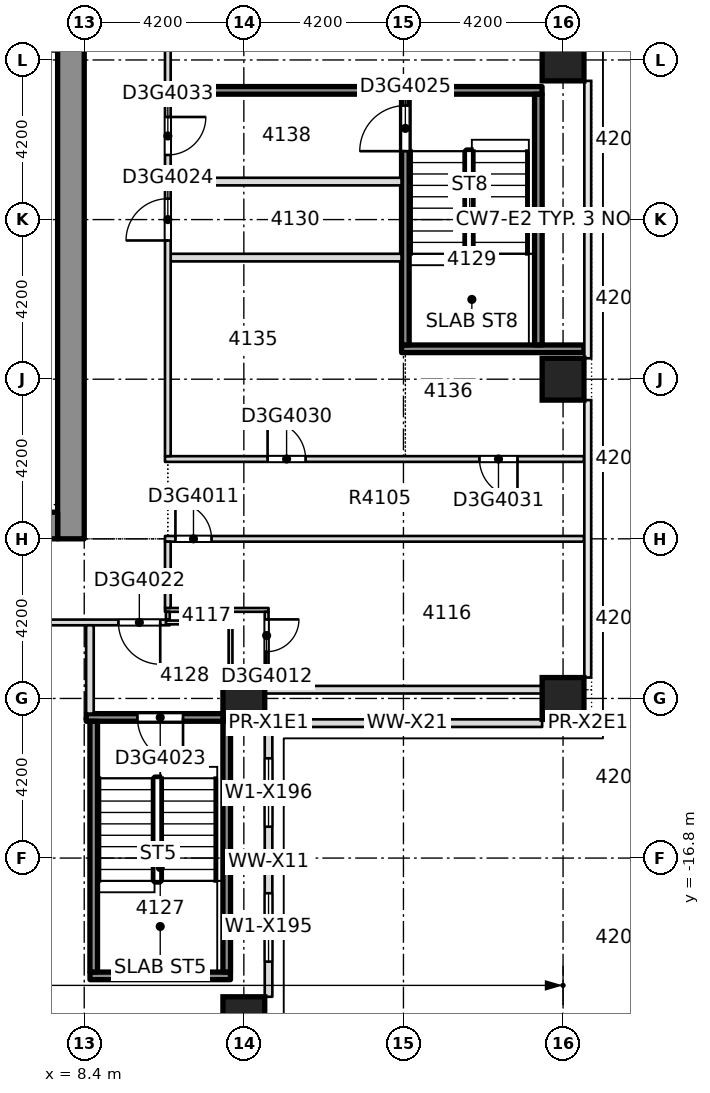
"""IFC4 building model, lengths in metres.
Left out: names, types, materials, properties, quantities, classifications, styles, units other than length and angle.
Written with IfcOpenShell. Run it as: python <this file> out.ifc"""

import sys

from ifc_helpers import new_model, si_unit, direction, frame, frame_2d, origin, origin_2d, place, context, subcontext, project, spatial, rectangle, extrude, element, fill, save


model = new_model("IFC4")
c1 = context("Model", 3, precision=1e-05, world=origin(), true_north=direction((0.0, 1.0)))
c2 = subcontext(c1, "Body", "Model", "MODEL_VIEW")
j1 = project(units=[si_unit("LENGTHUNIT", "METRE"), si_unit("PLANEANGLEUNIT", "RADIAN")], contexts=[c1])
p1 = place(None, origin())
s1 = spatial("IfcSite", under=j1, at=p1, CompositionType="ELEMENT")
p2 = place(p1, origin())
s2 = spatial("IfcBuilding", under=s1, at=p2, CompositionType="ELEMENT")
p3 = place(p2, frame((0.0, 0.0, 160.7)))
s3 = spatial("IfcBuildingStorey", under=s2, at=p3, CompositionType="ELEMENT", Elevation=160.7)
p4 = place(p3, frame((8.05, -8.4, -0.4), z_axis=(0.0, 0.0, 1.0), x_axis=(0.0, 1.0, 0.0)))
e1 = element("IfcWall", 1, at=p4, inside=s3, PredefinedType="SOLIDWALL", context=c2, shape_type="SweptSolid", body=[
    extrude(rectangle(XDim=30.15, YDim=0.7, at=frame_2d((15.075, 0.0))), origin(), (0.0, 0.0, 1.0), 3.45),
])
p5 = place(p4, frame((19.3, 0.0, 0.4)))
e2 = element("IfcOpeningElement", 2, at=p5, cuts=e1, PredefinedType="OPENING", context=c2, shape_type="SweptSolid", body=[
    extrude(rectangle(XDim=1.2, YDim=2.1, at=frame_2d((0.6, 1.05))), frame((0.0, 0.36, 0.0), z_axis=(0.0, -1.0, 0.0), x_axis=(1.0, 0.0, 0.0)), (0.0, 0.0, 1.0), 0.72),
])
p6 = place(p3, frame((-7.7, -8.05, -0.4), z_axis=(0.0, 0.0, 1.0), x_axis=(1.0, 0.0, 0.0)))
e3 = element("IfcWall", 3, at=p6, inside=s3, PredefinedType="SHEAR", context=c2, shape_type="SweptSolid", body=[
    extrude(rectangle(XDim=15.4, YDim=0.7, at=frame_2d((7.7, 0.0))), origin(), (0.0, 0.0, 1.0), 3.45),
])
p7 = place(p6, frame((2.95, 0.0, 0.4)))
e4 = element("IfcOpeningElement", 4, at=p7, cuts=e3, PredefinedType="OPENING", context=c2, shape_type="SweptSolid", body=[
    extrude(rectangle(XDim=1.8, YDim=2.1, at=frame_2d((0.9, 1.05))), frame((0.0, 0.36, 0.0), z_axis=(0.0, -1.0, 0.0), x_axis=(1.0, 0.0, 0.0)), (0.0, 0.0, 1.0), 0.72),
])
p8 = place(p6, frame((10.65, 0.0, 0.4)))
e5 = element("IfcOpeningElement", 5, at=p8, cuts=e3, PredefinedType="OPENING", context=c2, shape_type="SweptSolid", body=[
    extrude(rectangle(XDim=1.8, YDim=2.1, at=frame_2d((0.9, 1.05))), frame((0.0, 0.36, 0.0), z_axis=(0.0, -1.0, 0.0), x_axis=(1.0, 0.0, 0.0)), (0.0, 0.0, 1.0), 0.72),
])
for number, where, z_axis, x_axis in (
    (6, (12.6, -21.0, -0.4), (0.0, 0.0, 1.0), (1.0, 0.0, 0.0)),
    (7, (12.6, -12.6, -0.4), (0.0, 0.0, 1.0), (1.0, 0.0, 0.0)),
    (8, (21.0, -12.6, -0.4), (0.0, 0.0, 1.0), (1.0, 0.0, 0.0)),
    (9, (21.0, -4.2, -0.4), (0.0, 0.0, 1.0), (1.0, 0.0, 0.0)),
    (10, (21.0, 4.2, -0.4), (0.0, 0.0, 1.0), (1.0, 0.0, 0.0)),
):
    element("IfcColumn", number, at=place(p3, frame(where, z_axis=z_axis, x_axis=x_axis)), inside=s3, PredefinedType="COLUMN", context=c2, shape_type="SweptSolid", body=[
        extrude(rectangle(XDim=1.1, YDim=1.1, at=origin_2d()), origin(), (0.0, 0.0, 1.0), 3.45),
    ])
p9 = place(p3, frame((8.552, -19.9, 0.0), z_axis=(0.0, 0.0, 1.0), x_axis=(1.0, 0.0, 0.0)))
e11 = element("IfcWall", 11, at=p9, inside=s3, PredefinedType="SOLIDWALL", context=c2, shape_type="SweptSolid", body=[
    extrude(rectangle(XDim=3.696, YDim=0.2, at=frame_2d((1.848, 0.0))), origin(), (0.0, 0.0, 1.0), 3.05),
])
p10 = place(p3, frame((8.452, -13.1, 0.0), z_axis=(0.0, 0.0, 1.0), x_axis=(1.0, 0.0, 0.0)))
e12 = element("IfcWall", 12, at=p10, inside=s3, PredefinedType="SOLIDWALL", context=c2, shape_type="SweptSolid", body=[
    extrude(rectangle(XDim=3.896, YDim=0.2, at=frame_2d((1.948, 0.0))), origin(), (0.0, 0.0, 1.0), 3.05),
])
p11 = place(p10, frame((1.348, 0.0, 0.0)))
e13 = element("IfcOpeningElement", 13, at=p11, cuts=e12, PredefinedType="OPENING", context=c2, shape_type="SweptSolid", body=[
    extrude(rectangle(XDim=1.2, YDim=2.1, at=frame_2d((0.6, 1.05))), frame((0.0, 0.11, 0.0), z_axis=(0.0, -1.0, 0.0), x_axis=(1.0, 0.0, 0.0)), (0.0, 0.0, 1.0), 0.22),
])
p12 = place(p3, frame((12.152, -12.37, 0.0), z_axis=(0.0, 0.0, 1.0), x_axis=(1.0, 0.0, 0.0)))
e14 = element("IfcWall", 14, at=p12, inside=s3, PredefinedType="PARTITIONING", context=c2, shape_type="SweptSolid", body=[
    extrude(rectangle(XDim=1.098, YDim=0.1, at=frame_2d((0.549, 0.0))), origin(), (0.0, 0.0, 1.0), 3.05),
])
p13 = place(p3, frame((-10.6, -10.6, 0.0), z_axis=(0.0, 0.0, 1.0), x_axis=(1.0, 0.0, 0.0)))
e15 = element("IfcWall", 15, at=p13, inside=s3, PredefinedType="PARTITIONING", context=c2, shape_type="SweptSolid", body=[
    extrude(rectangle(XDim=21.25, YDim=0.15, at=frame_2d((10.625, 0.0))), origin(), (0.0, 0.0, 1.0), 3.05),
])
p14 = place(p13, frame((4.925, 0.0, 0.0)))
e16 = element("IfcOpeningElement", 16, at=p14, cuts=e15, PredefinedType="OPENING", context=c2, shape_type="SweptSolid", body=[
    extrude(rectangle(XDim=0.95, YDim=2.1, at=frame_2d((0.475, 1.05))), frame((0.0, 0.085, 0.0), z_axis=(0.0, -1.0, 0.0), x_axis=(1.0, 0.0, 0.0)), (0.0, 0.0, 1.0), 0.17),
])
p15 = place(p13, frame((15.325, 0.0, 0.0)))
e17 = element("IfcOpeningElement", 17, at=p15, cuts=e15, PredefinedType="OPENING", context=c2, shape_type="SweptSolid", body=[
    extrude(rectangle(XDim=0.95, YDim=2.1, at=frame_2d((0.475, 1.05))), frame((0.0, 0.085, 0.0), z_axis=(0.0, -1.0, 0.0), x_axis=(1.0, 0.0, 0.0)), (0.0, 0.0, 1.0), 0.17),
])
p16 = place(p13, frame((0.2, 0.0, 0.0)))
e18 = element("IfcOpeningElement", 18, at=p16, cuts=e15, PredefinedType="OPENING", context=c2, shape_type="SweptSolid", body=[
    extrude(rectangle(XDim=1.1, YDim=2.1, at=frame_2d((0.55, 1.05))), frame((0.0, 0.085, 0.0), z_axis=(0.0, -1.0, 0.0), x_axis=(1.0, 0.0, 0.0)), (0.0, 0.0, 1.0), 0.17),
])
p17 = place(p13, frame((10.05, 0.0, 0.0)))
e19 = element("IfcOpeningElement", 19, at=p17, cuts=e15, PredefinedType="OPENING", context=c2, shape_type="SweptSolid", body=[
    extrude(rectangle(XDim=1.1, YDim=2.1, at=frame_2d((0.55, 1.05))), frame((0.0, 0.085, 0.0), z_axis=(0.0, -1.0, 0.0), x_axis=(1.0, 0.0, 0.0)), (0.0, 0.0, 1.0), 0.17),
])
p18 = place(p13, frame((19.9, 0.0, 0.0)))
e20 = element("IfcOpeningElement", 20, at=p18, cuts=e15, PredefinedType="OPENING", context=c2, shape_type="SweptSolid", body=[
    extrude(rectangle(XDim=1.1, YDim=2.1, at=frame_2d((0.55, 1.05))), frame((0.0, 0.085, 0.0), z_axis=(0.0, -1.0, 0.0), x_axis=(1.0, 0.0, 0.0)), (0.0, 0.0, 1.0), 0.17),
])
p19 = place(p3, frame((10.55, -10.6, 0.0), z_axis=(0.0, 0.0, 1.0), x_axis=(1.0, 0.0, 0.0)))
e21 = element("IfcWall", 21, at=p19, inside=s3, PredefinedType="PARTITIONING", context=c2, shape_type="SweptSolid", body=[
    extrude(rectangle(XDim=1.75, YDim=0.1, at=frame_2d((0.875, 0.0))), origin(), (0.0, 0.0, 1.0), 3.05),
])
p20 = place(p3, frame((10.525, -10.27, 0.0), z_axis=(0.0, 0.0, 1.0), x_axis=(1.0, 0.0, 0.0)))
e22 = element("IfcWall", 22, at=p20, inside=s3, PredefinedType="PARTITIONING", context=c2, shape_type="SweptSolid", body=[
    extrude(rectangle(XDim=2.725, YDim=0.1, at=frame_2d((1.363, 0.0))), origin(), (0.0, 0.0, 1.0), 3.05),
])
p21 = place(p3, frame((10.525, -8.4, 0.0), z_axis=(0.0, 0.0, 1.0), x_axis=(1.0, 0.0, 0.0)))
e23 = element("IfcWall", 23, at=p21, inside=s3, PredefinedType="PARTITIONING", context=c2, shape_type="SweptSolid", body=[
    extrude(rectangle(XDim=11.025, YDim=0.15, at=frame_2d((5.513, 0.0))), origin(), (0.0, 0.0, 1.0), 3.05),
])
p22 = place(p21, frame((0.275, 0.0, 0.0)))
e24 = element("IfcOpeningElement", 24, at=p22, cuts=e23, PredefinedType="OPENING", context=c2, shape_type="SweptSolid", body=[
    extrude(rectangle(XDim=0.95, YDim=2.1, at=frame_2d((0.475, 1.05))), frame((0.0, 0.085, 0.0), z_axis=(0.0, -1.0, 0.0), x_axis=(1.0, 0.0, 0.0)), (0.0, 0.0, 1.0), 0.17),
])
p23 = place(p3, frame((10.525, -6.3, 0.0), z_axis=(0.0, 0.0, 1.0), x_axis=(1.0, 0.0, 0.0)))
e25 = element("IfcWall", 25, at=p23, inside=s3, PredefinedType="PARTITIONING", context=c2, shape_type="SweptSolid", body=[
    extrude(rectangle(XDim=11.025, YDim=0.15, at=frame_2d((5.513, 0.0))), origin(), (0.0, 0.0, 1.0), 3.05),
])
p24 = place(p23, frame((2.7, 0.0, 0.0)))
e26 = element("IfcOpeningElement", 26, at=p24, cuts=e25, PredefinedType="OPENING", context=c2, shape_type="SweptSolid", body=[
    extrude(rectangle(XDim=1.0, YDim=2.1, at=frame_2d((0.5, 1.05))), frame((0.0, 0.085, 0.0), z_axis=(0.0, -1.0, 0.0), x_axis=(1.0, 0.0, 0.0)), (0.0, 0.0, 1.0), 0.17),
])
p25 = place(p23, frame((8.276, 0.0, 0.0)))
e27 = element("IfcOpeningElement", 27, at=p25, cuts=e25, PredefinedType="OPENING", context=c2, shape_type="SweptSolid", body=[
    extrude(rectangle(XDim=1.0, YDim=2.1, at=frame_2d((0.5, 1.05))), frame((0.0, 0.085, 0.0), z_axis=(0.0, -1.0, 0.0), x_axis=(1.0, 0.0, 0.0)), (0.0, 0.0, 1.0), 0.17),
])
p26 = place(p3, frame((16.751, -3.4, 0.0), z_axis=(0.0, 0.0, 1.0), x_axis=(1.0, 0.0, 0.0)))
e28 = element("IfcWall", 28, at=p26, inside=s3, PredefinedType="SOLIDWALL", context=c2, shape_type="SweptSolid", body=[
    extrude(rectangle(XDim=4.799, YDim=0.2, at=frame_2d((2.399, 0.0))), origin(), (0.0, 0.0, 1.0), 3.05),
])
for number, where, z_axis, x_axis in (
    (29, (10.675, -1.0, 0.0), (0.0, 0.0, 1.0), (1.0, 0.0, 0.0)),
    (30, (10.675, 1.0, 0.0), (0.0, 0.0, 1.0), (1.0, 0.0, 0.0)),
):
    element("IfcWall", number, at=place(p3, frame(where, z_axis=z_axis, x_axis=x_axis)), inside=s3, PredefinedType="PARTITIONING", context=c2, shape_type="SweptSolid", body=[
        extrude(rectangle(XDim=6.075, YDim=0.2, at=frame_2d((3.038, 0.0))), origin(), (0.0, 0.0, 1.0), 3.05),
    ])
p27 = place(p3, frame((10.675, 3.4, 0.0), z_axis=(0.0, 0.0, 1.0), x_axis=(1.0, 0.0, 0.0)))
e31 = element("IfcWall", 31, at=p27, inside=s3, PredefinedType="SOLIDWALL", context=c2, shape_type="SweptSolid", body=[
    extrude(rectangle(XDim=9.773, YDim=0.2, at=frame_2d((4.886, 0.0))), origin(), (0.0, 0.0, 1.0), 3.05),
])
p28 = place(p3, frame((8.55, -12.998, 0.0), z_axis=(0.0, 0.0, 1.0), x_axis=(0.0, 1.0, 0.0)))
e32 = element("IfcWall", 32, at=p28, inside=s3, PredefinedType="PARTITIONING", context=c2, shape_type="SweptSolid", body=[
    extrude(rectangle(XDim=2.323, YDim=0.2, at=frame_2d((1.162, 0.0))), origin(), (0.0, 0.0, 1.0), 3.05),
])
p29 = place(p3, frame((8.65, -19.798, 0.0), z_axis=(0.0, 0.0, 1.0), x_axis=(0.0, 1.0, 0.0)))
e33 = element("IfcWall", 33, at=p29, inside=s3, PredefinedType="SOLIDWALL", context=c2, shape_type="SweptSolid", body=[
    extrude(rectangle(XDim=6.596, YDim=0.2, at=frame_2d((3.298, 0.0))), origin(), (0.0, 0.0, 1.0), 3.05),
])
p30 = place(p3, frame((10.6, -10.525, 0.0), z_axis=(0.0, 0.0, 1.0), x_axis=(0.0, 1.0, 0.0)))
e34 = element("IfcWall", 34, at=p30, inside=s3, PredefinedType="PARTITIONING", context=c2, shape_type="SweptSolid", body=[
    extrude(rectangle(XDim=0.205, YDim=0.1, at=frame_2d((0.103, 0.0))), origin(), (0.0, 0.0, 1.0), 3.05),
])
p31 = place(p3, frame((10.6, -10.22, 0.0), z_axis=(0.0, 0.0, 1.0), x_axis=(0.0, 1.0, 0.0)))
e35 = element("IfcWall", 35, at=p31, inside=s3, PredefinedType="PARTITIONING", context=c2, shape_type="SweptSolid", body=[
    extrude(rectangle(XDim=1.745, YDim=0.15, at=frame_2d((0.873, 0.0))), origin(), (0.0, 0.0, 1.0), 3.05),
])
p32 = place(p3, frame((10.6, -6.225, 0.0), z_axis=(0.0, 0.0, 1.0), x_axis=(0.0, 1.0, 0.0)))
e36 = element("IfcWall", 36, at=p32, inside=s3, PredefinedType="PARTITIONING", context=c2, shape_type="SweptSolid", body=[
    extrude(rectangle(XDim=14.745, YDim=0.15, at=frame_2d((7.373, 0.0))), origin(), (0.0, 0.0, 1.0), 3.05),
])
p33 = place(p32, frame((11.735, 0.0, 0.0)))
e37 = element("IfcOpeningElement", 37, at=p33, cuts=e36, PredefinedType="OPENING", context=c2, shape_type="SweptSolid", body=[
    extrude(rectangle(XDim=0.95, YDim=2.1, at=frame_2d((0.475, 1.05))), frame((0.0, 0.085, 0.0), z_axis=(0.0, -1.0, 0.0), x_axis=(1.0, 0.0, 0.0)), (0.0, 0.0, 1.0), 0.17),
])
p34 = place(p32, frame((5.675, 0.0, 0.0)))
e38 = element("IfcOpeningElement", 38, at=p34, cuts=e36, PredefinedType="OPENING", context=c2, shape_type="SweptSolid", body=[
    extrude(rectangle(XDim=1.1, YDim=2.1, at=frame_2d((0.55, 1.05))), frame((0.0, 0.085, 0.0), z_axis=(0.0, -1.0, 0.0), x_axis=(1.0, 0.0, 0.0)), (0.0, 0.0, 1.0), 0.17),
])
p35 = place(p32, frame((7.925, 0.0, 0.0)))
e39 = element("IfcOpeningElement", 39, at=p35, cuts=e36, PredefinedType="OPENING", context=c2, shape_type="SweptSolid", body=[
    extrude(rectangle(XDim=1.0, YDim=2.1, at=frame_2d((0.5, 1.05))), frame((0.0, 0.085, 0.0), z_axis=(0.0, -1.0, 0.0), x_axis=(1.0, 0.0, 0.0)), (0.0, 0.0, 1.0), 0.17),
])
p36 = place(p3, frame((12.15, -19.798, 0.0), z_axis=(0.0, 0.0, 1.0), x_axis=(0.0, 1.0, 0.0)))
e40 = element("IfcWall", 40, at=p36, inside=s3, PredefinedType="SOLIDWALL", context=c2, shape_type="SweptSolid", body=[
    extrude(rectangle(XDim=6.596, YDim=0.2, at=frame_2d((3.298, 0.0))), origin(), (0.0, 0.0, 1.0), 3.05),
])
p37 = place(p3, frame((12.25, -12.998, 0.0), z_axis=(0.0, 0.0, 1.0), x_axis=(0.0, 1.0, 0.0)))
e41 = element("IfcWall", 41, at=p37, inside=s3, PredefinedType="PARTITIONING", context=c2, shape_type="SweptSolid", body=[
    extrude(rectangle(XDim=0.576, YDim=0.2, at=frame_2d((0.288, 0.0))), origin(), (0.0, 0.0, 1.0), 3.05),
])
p38 = place(p3, frame((12.25, -12.32, 0.0), z_axis=(0.0, 0.0, 1.0), x_axis=(0.0, 1.0, 0.0)))
e42 = element("IfcWall", 42, at=p38, inside=s3, PredefinedType="PARTITIONING", context=c2, shape_type="SweptSolid", body=[
    extrude(rectangle(XDim=1.67, YDim=0.1, at=frame_2d((0.835, 0.0))), origin(), (0.0, 0.0, 1.0), 3.05),
])
p39 = place(p3, frame((13.2, -12.27, 0.0), z_axis=(0.0, 0.0, 1.0), x_axis=(0.0, 1.0, 0.0)))
e43 = element("IfcWall", 43, at=p39, inside=s3, PredefinedType="PARTITIONING", context=c2, shape_type="SweptSolid", body=[
    extrude(rectangle(XDim=1.95, YDim=0.1, at=frame_2d((0.975, 0.0))), origin(), (0.0, 0.0, 1.0), 3.05),
])
p40 = place(p39, frame((0.9, 0.0, 0.0)))
e44 = element("IfcOpeningElement", 44, at=p40, cuts=e43, PredefinedType="OPENING", context=c2, shape_type="SweptSolid", body=[
    extrude(rectangle(XDim=0.85, YDim=2.1, at=frame_2d((0.425, 1.05))), frame((0.0, 0.06, 0.0), z_axis=(0.0, -1.0, 0.0), x_axis=(1.0, 0.0, 0.0)), (0.0, 0.0, 1.0), 0.12),
])
p41 = place(p3, frame((16.85, -3.3, 0.0), z_axis=(0.0, 0.0, 1.0), x_axis=(0.0, 1.0, 0.0)))
e45 = element("IfcWall", 45, at=p41, inside=s3, PredefinedType="SOLIDWALL", context=c2, shape_type="SweptSolid", body=[
    extrude(rectangle(XDim=6.6, YDim=0.2, at=frame_2d((3.3, 0.0))), origin(), (0.0, 0.0, 1.0), 3.05),
])
p42 = place(p41, frame((5.1, 0.0, 0.0)))
e46 = element("IfcOpeningElement", 46, at=p42, cuts=e45, PredefinedType="OPENING", context=c2, shape_type="SweptSolid", body=[
    extrude(rectangle(XDim=1.2, YDim=2.1, at=frame_2d((0.6, 1.05))), frame((0.0, 0.11, 0.0), z_axis=(0.0, -1.0, 0.0), x_axis=(1.0, 0.0, 0.0)), (0.0, 0.0, 1.0), 0.22),
])
p43 = place(p3, frame((20.35, -3.298, 0.0), z_axis=(0.0, 0.0, 1.0), x_axis=(0.0, 1.0, 0.0)))
e47 = element("IfcWall", 47, at=p43, inside=s3, PredefinedType="SOLIDWALL", context=c2, shape_type="SweptSolid", body=[
    extrude(rectangle(XDim=6.596, YDim=0.2, at=frame_2d((3.298, 0.0))), origin(), (0.0, 0.0, 1.0), 3.05),
])
p44 = place(p3, frame((13.25, -20.45, 0.0), z_axis=(0.0, 0.0, 1.0), x_axis=(0.0, 1.0, 0.0)))
e48 = element("IfcWall", 48, at=p44, inside=s3, PredefinedType="STANDARD", context=c2, shape_type="SweptSolid", body=[
    extrude(rectangle(XDim=7.1, YDim=0.2, at=frame_2d((3.55, 0.0))), origin(), (0.0, 0.0, 1.0), 3.05),
])
p45 = place(p44, frame((0.925, 0.0, 0.2)))
e49 = element("IfcOpeningElement", 49, at=p45, cuts=e48, PredefinedType="OPENING", context=c2, shape_type="SweptSolid", body=[
    extrude(rectangle(XDim=1.8, YDim=2.65, at=frame_2d((0.9, 1.325))), frame((0.0, 0.11, 0.0), z_axis=(0.0, -1.0, 0.0), x_axis=(1.0, 0.0, 0.0)), (0.0, 0.0, 1.0), 0.22),
])
p46 = place(p44, frame((4.475, 0.0, 0.2)))
e50 = element("IfcOpeningElement", 50, at=p46, cuts=e48, PredefinedType="OPENING", context=c2, shape_type="SweptSolid", body=[
    extrude(rectangle(XDim=1.8, YDim=2.65, at=frame_2d((0.9, 1.325))), frame((0.0, 0.11, 0.0), z_axis=(0.0, -1.0, 0.0), x_axis=(1.0, 0.0, 0.0)), (0.0, 0.0, 1.0), 0.22),
])
p47 = place(p3, frame((13.35, -13.25, 0.0), z_axis=(0.0, 0.0, 1.0), x_axis=(1.0, 0.0, 0.0)))
e51 = element("IfcWall", 51, at=p47, inside=s3, PredefinedType="STANDARD", context=c2, shape_type="SweptSolid", body=[
    extrude(rectangle(XDim=7.1, YDim=0.2, at=frame_2d((3.55, 0.0))), origin(), (0.0, 0.0, 1.0), 3.05),
])
p48 = place(p3, frame((13.15, -12.37, 0.0), z_axis=(0.0, 0.0, 1.0), x_axis=(1.0, 0.0, 0.0)))
e52 = element("IfcWall", 52, at=p48, inside=s3, PredefinedType="PARTITIONING", context=c2, shape_type="SweptSolid", body=[
    extrude(rectangle(XDim=7.3, YDim=0.2, at=frame_2d((3.65, 0.0))), origin(), (0.0, 0.0, 1.0), 2.5),
])
p49 = place(p3, frame((20.45, -12.37, 0.0), z_axis=(0.0, 0.0, 1.0), x_axis=(1.0, 0.0, 0.0)))
e53 = element("IfcWall", 53, at=p49, inside=s3, PredefinedType="PARTITIONING", context=c2, shape_type="SweptSolid", body=[
    extrude(rectangle(XDim=1.1, YDim=0.2, at=frame_2d((0.55, 0.0))), origin(), (0.0, 0.0, 1.0), 3.05),
])
p50 = place(p22, origin())
e54 = element("IfcDoor", 54, at=p50, inside=s3, OperationType="SINGLE_SWING_RIGHT", PredefinedType="DOOR", context=c2, shape_type="SweptSolid", body=[
    extrude(rectangle(XDim=0.95, YDim=2.1, at=frame_2d((0.475, 1.05))), frame((0.0, 0.025, 0.0), z_axis=(0.0, -1.0, 0.0), x_axis=(1.0, 0.0, 0.0)), (0.0, 0.0, 1.0), 0.05),
])
fill(e24, e54)
p51 = place(p40, origin())
e55 = element("IfcDoor", 55, at=p51, inside=s3, OperationType="SINGLE_SWING_LEFT", PredefinedType="DOOR", context=c2, shape_type="SweptSolid", body=[
    extrude(rectangle(XDim=0.85, YDim=2.1, at=frame_2d((0.425, 1.05))), frame((0.0, 0.025, 0.0), z_axis=(0.0, -1.0, 0.0), x_axis=(1.0, 0.0, 0.0)), (0.0, 0.0, 1.0), 0.05),
])
fill(e44, e55)
p52 = place(p18, origin())
e56 = element("IfcDoor", 56, at=p52, inside=s3, OperationType="SINGLE_SWING_LEFT", PredefinedType="DOOR", context=c2, shape_type="SweptSolid", body=[
    extrude(rectangle(XDim=1.1, YDim=2.1, at=frame_2d((0.55, 1.05))), frame((0.0, 0.025, 0.0), z_axis=(0.0, -1.0, 0.0), x_axis=(1.0, 0.0, 0.0)), (0.0, 0.0, 1.0), 0.05),
])
fill(e20, e56)
p53 = place(p11, origin())
e57 = element("IfcDoor", 57, at=p53, inside=s3, OperationType="SINGLE_SWING_RIGHT", PredefinedType="DOOR", context=c2, shape_type="SweptSolid", body=[
    extrude(rectangle(XDim=1.2, YDim=2.1, at=frame_2d((0.6, 1.05))), frame((0.0, 0.025, 0.0), z_axis=(0.0, -1.0, 0.0), x_axis=(1.0, 0.0, 0.0)), (0.0, 0.0, 1.0), 0.05),
])
fill(e13, e57)
p54 = place(p34, origin())
e58 = element("IfcDoor", 58, at=p54, inside=s3, OperationType="SINGLE_SWING_LEFT", PredefinedType="DOOR", context=c2, shape_type="SweptSolid", body=[
    extrude(rectangle(XDim=1.1, YDim=2.1, at=frame_2d((0.55, 1.05))), frame((0.0, 0.025, 0.0), z_axis=(0.0, -1.0, 0.0), x_axis=(1.0, 0.0, 0.0)), (0.0, 0.0, 1.0), 0.05),
])
fill(e38, e58)
p55 = place(p42, origin())
e59 = element("IfcDoor", 59, at=p55, inside=s3, OperationType="SINGLE_SWING_LEFT", PredefinedType="DOOR", context=c2, shape_type="SweptSolid", body=[
    extrude(rectangle(XDim=1.2, YDim=2.1, at=frame_2d((0.6, 1.05))), frame((0.0, 0.025, 0.0), z_axis=(0.0, -1.0, 0.0), x_axis=(1.0, 0.0, 0.0)), (0.0, 0.0, 1.0), 0.05),
])
fill(e46, e59)
p56 = place(p24, origin())
e60 = element("IfcDoor", 60, at=p56, inside=s3, OperationType="SINGLE_SWING_RIGHT", PredefinedType="DOOR", context=c2, shape_type="SweptSolid", body=[
    extrude(rectangle(XDim=1.0, YDim=2.1, at=frame_2d((0.5, 1.05))), frame((0.0, 0.025, 0.0), z_axis=(0.0, -1.0, 0.0), x_axis=(1.0, 0.0, 0.0)), (0.0, 0.0, 1.0), 0.05),
])
fill(e26, e60)
p57 = place(p25, origin())
e61 = element("IfcDoor", 61, at=p57, inside=s3, OperationType="SINGLE_SWING_RIGHT", PredefinedType="DOOR", context=c2, shape_type="SweptSolid", body=[
    extrude(rectangle(XDim=1.0, YDim=2.1, at=frame_2d((0.5, 1.05))), frame((0.0, 0.025, 0.0), z_axis=(0.0, -1.0, 0.0), x_axis=(1.0, 0.0, 0.0)), (0.0, 0.0, 1.0), 0.05),
])
fill(e27, e61)
p58 = place(p35, origin())
e62 = element("IfcDoor", 62, at=p58, inside=s3, OperationType="SINGLE_SWING_RIGHT", PredefinedType="DOOR", context=c2, shape_type="SweptSolid", body=[
    extrude(rectangle(XDim=1.0, YDim=2.1, at=frame_2d((0.5, 1.05))), frame((0.0, 0.025, 0.0), z_axis=(0.0, -1.0, 0.0), x_axis=(1.0, 0.0, 0.0)), (0.0, 0.0, 1.0), 0.05),
])
fill(e39, e62)
p59 = place(p45, origin())
e63 = element("IfcWindow", 63, at=p59, inside=s3, PartitioningType="SINGLE_PANEL", PredefinedType="WINDOW", context=c2, shape_type="SweptSolid", body=[
    extrude(rectangle(XDim=1.8, YDim=2.65, at=frame_2d((0.9, 1.325))), frame((0.0, 0.03, 0.0), z_axis=(0.0, -1.0, 0.0), x_axis=(1.0, 0.0, 0.0)), (0.0, 0.0, 1.0), 0.06),
])
fill(e49, e63)
p60 = place(p46, origin())
e64 = element("IfcWindow", 64, at=p60, inside=s3, PartitioningType="SINGLE_PANEL", PredefinedType="WINDOW", context=c2, shape_type="SweptSolid", body=[
    extrude(rectangle(XDim=1.8, YDim=2.65, at=frame_2d((0.9, 1.325))), frame((0.0, 0.03, 0.0), z_axis=(0.0, -1.0, 0.0), x_axis=(1.0, 0.0, 0.0)), (0.0, 0.0, 1.0), 0.06),
])
fill(e50, e64)
save(model, sys.argv[1])
